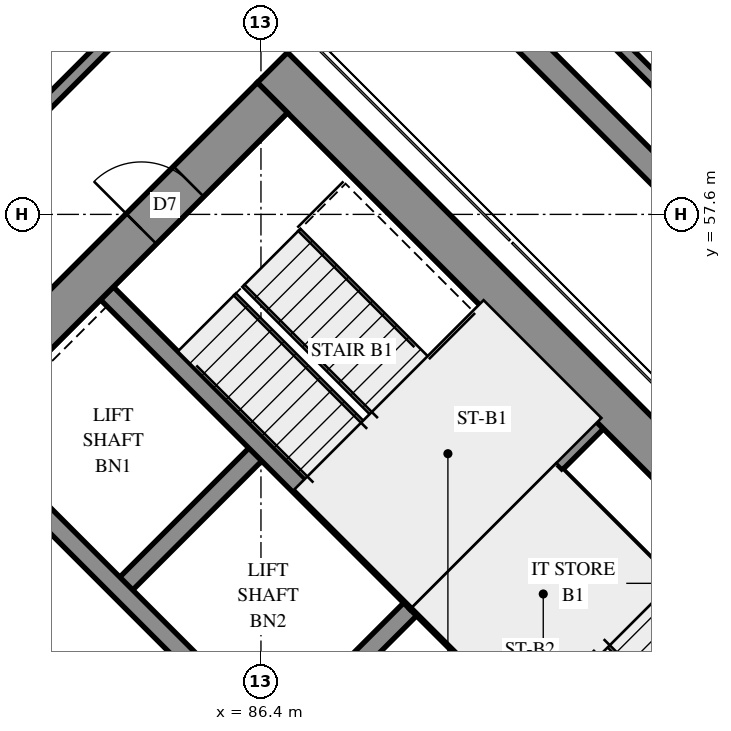
"""IFC4 building model, lengths in metres.
Left out: names, types, materials, properties, quantities, classifications, styles, units other than length and angle.
Written with IfcOpenShell. Run it as: python <this file> out.ifc"""

import sys

from ifc_helpers import new_model, si_unit, direction, frame, frame_2d, origin, place, context, subcontext, project, spatial, polyline, rectangle, outline, extrude, element, fill, save


model = new_model("IFC4")
c1 = context("Model", 3, precision=1e-05, world=origin(), true_north=direction((0.0, 1.0)))
c2 = subcontext(c1, "Body", "Model", "MODEL_VIEW")
j1 = project(units=[si_unit("LENGTHUNIT", "METRE"), si_unit("PLANEANGLEUNIT", "RADIAN")], contexts=[c1])
p1 = place(None, origin())
s1 = spatial("IfcSite", under=j1, at=p1, CompositionType="ELEMENT")
p2 = place(p1, origin())
s2 = spatial("IfcBuilding", under=s1, at=p2, CompositionType="ELEMENT")
p3 = place(p2, frame((0.0, 0.0, 122.0)))
s3 = spatial("IfcBuildingStorey", under=s2, at=p3, CompositionType="ELEMENT", Elevation=122.0)
p4 = place(p3, frame((86.589, 60.014, -0.3), z_axis=(0.0, 0.0, 1.0), x_axis=(0.7071099457, -0.7071036166, 0.0)))
e1 = element("IfcWall", 1, at=p4, inside=s3, PredefinedType="SHEAR", context=c2, shape_type="SweptSolid", body=[
    extrude(rectangle(XDim=15.8, YDim=0.7, at=frame_2d((7.9, 0.0))), origin(), (0.0, 0.0, 1.0), 3.5),
])
p5 = place(p4, frame((10.7, 0.0, 0.3)))
e2 = element("IfcOpeningElement", 2, at=p5, cuts=e1, PredefinedType="OPENING", context=c2, shape_type="SweptSolid", body=[
    extrude(rectangle(XDim=0.8, YDim=2.1, at=frame_2d((0.4, 1.05))), frame((0.0, 0.36, 0.0), z_axis=(0.0, -1.0, 0.0), x_axis=(1.0, 0.0, 0.0)), (0.0, 0.0, 1.0), 0.72),
])
p6 = place(p3, frame((76.407, 49.337, -0.3), z_axis=(0.0, 0.0, 1.0), x_axis=(0.7071067812, 0.7071067812, 0.0)))
e3 = element("IfcWall", 3, at=p6, inside=s3, PredefinedType="SHEAR", context=c2, shape_type="SweptSolid", body=[
    extrude(rectangle(XDim=14.4, YDim=0.7, at=frame_2d((7.2, 0.0))), origin(), (0.0, 0.0, 1.0), 3.5),
])
p7 = place(p6, frame((4.55, 0.0, 0.3)))
e4 = element("IfcOpeningElement", 4, at=p7, cuts=e3, PredefinedType="OPENING", context=c2, shape_type="SweptSolid", body=[
    extrude(rectangle(XDim=1.1, YDim=2.1, at=frame_2d((0.55, 1.05))), frame((0.0, 0.36, 0.0), z_axis=(0.0, -1.0, 0.0), x_axis=(1.0, 0.0, 0.0)), (0.0, 0.0, 1.0), 0.72),
])
p8 = place(p6, frame((11.35, 0.0, 0.3)))
e5 = element("IfcOpeningElement", 5, at=p8, cuts=e3, PredefinedType="OPENING", context=c2, shape_type="SweptSolid", body=[
    extrude(rectangle(XDim=1.1, YDim=2.1, at=frame_2d((0.55, 1.05))), frame((0.0, 0.36, 0.0), z_axis=(0.0, -1.0, 0.0), x_axis=(1.0, 0.0, 0.0)), (0.0, 0.0, 1.0), 0.72),
])
p9 = place(p3, frame((84.079, 51.423, 0.0), z_axis=(0.0, 0.0, 1.0), x_axis=(0.7071219326, 0.7070916295, 0.0)))
e6 = element("IfcWall", 6, at=p9, inside=s3, PredefinedType="SOLIDWALL", context=c2, shape_type="SweptSolid", body=[
    extrude(rectangle(XDim=3.3, YDim=0.3, at=frame_2d((1.65, 0.0))), origin(), (0.0, 0.0, 1.0), 3.9),
])
p10 = place(p3, frame((86.625, 48.878, 0.0), z_axis=(0.0, 0.0, 1.0), x_axis=(0.7071067812, 0.7071067812, 0.0)))
e7 = element("IfcWall", 7, at=p10, inside=s3, PredefinedType="SOLIDWALL", context=c2, shape_type="SweptSolid", body=[
    extrude(rectangle(XDim=3.3, YDim=0.3, at=frame_2d((1.65, 0.0))), origin(), (0.0, 0.0, 1.0), 3.9),
])
p11 = place(p3, frame((78.988, 51.423, 0.0), z_axis=(0.0, 0.0, 1.0), x_axis=(0.7071067812, -0.7071067812, 0.0)))
e8 = element("IfcWall", 8, at=p11, inside=s3, PredefinedType="SOLIDWALL", context=c2, shape_type="SweptSolid", body=[
    extrude(rectangle(XDim=14.4, YDim=0.3, at=frame_2d((7.2, 0.0))), origin(), (0.0, 0.0, 1.0), 3.9),
])
p12 = place(p11, frame((1.25, 0.0, 0.0)))
e9 = element("IfcOpeningElement", 9, at=p12, cuts=e8, PredefinedType="OPENING", context=c2, shape_type="SweptSolid", body=[
    extrude(rectangle(XDim=1.1, YDim=2.1, at=frame_2d((0.55, 1.05))), frame((0.0, 0.16, 0.0), z_axis=(0.0, -1.0, 0.0), x_axis=(1.0, 0.0, 0.0)), (0.0, 0.0, 1.0), 0.32),
])
p13 = place(p11, frame((4.85, 0.0, 0.0)))
e10 = element("IfcOpeningElement", 10, at=p13, cuts=e8, PredefinedType="OPENING", context=c2, shape_type="SweptSolid", body=[
    extrude(rectangle(XDim=1.1, YDim=2.1, at=frame_2d((0.55, 1.05))), frame((0.0, 0.16, 0.0), z_axis=(0.0, -1.0, 0.0), x_axis=(1.0, 0.0, 0.0)), (0.0, 0.0, 1.0), 0.32),
])
p14 = place(p11, frame((8.45, 0.0, 0.0)))
e11 = element("IfcOpeningElement", 11, at=p14, cuts=e8, PredefinedType="OPENING", context=c2, shape_type="SweptSolid", body=[
    extrude(rectangle(XDim=1.1, YDim=2.1, at=frame_2d((0.55, 1.05))), frame((0.0, 0.16, 0.0), z_axis=(0.0, -1.0, 0.0), x_axis=(1.0, 0.0, 0.0)), (0.0, 0.0, 1.0), 0.32),
])
p15 = place(p11, frame((12.05, 0.0, 0.0)))
e12 = element("IfcOpeningElement", 12, at=p15, cuts=e8, PredefinedType="OPENING", context=c2, shape_type="SweptSolid", body=[
    extrude(rectangle(XDim=1.1, YDim=2.1, at=frame_2d((0.55, 1.05))), frame((0.0, 0.16, 0.0), z_axis=(0.0, -1.0, 0.0), x_axis=(1.0, 0.0, 0.0)), (0.0, 0.0, 1.0), 0.32),
])
p16 = place(p3, frame((81.534, 53.969, 0.0), z_axis=(0.0, 0.0, 1.0), x_axis=(0.707103309, -0.7071102534, 0.0)))
e13 = element("IfcWall", 13, at=p16, inside=s3, PredefinedType="SOLIDWALL", context=c2, shape_type="SweptSolid", body=[
    extrude(rectangle(XDim=14.4, YDim=0.3, at=frame_2d((7.2, 0.0))), origin(), (0.0, 0.0, 1.0), 3.9),
])
p17 = place(p16, frame((12.05, 0.0, 0.0)))
e14 = element("IfcOpeningElement", 14, at=p17, cuts=e13, PredefinedType="OPENING", context=c2, shape_type="SweptSolid", body=[
    extrude(rectangle(XDim=1.1, YDim=2.1, at=frame_2d((0.55, 1.05))), frame((0.0, 0.16, 0.0), z_axis=(0.0, -1.0, 0.0), x_axis=(1.0, 0.0, 0.0)), (0.0, 0.0, 1.0), 0.32),
])
for number, where, z_axis, x_axis in (
    (15, (83.867, 56.302, 0.0), (0.0, 0.0, 1.0), (0.707, -0.707, 0.0)),
    (16, (88.958, 51.211, 0.0), (0.0, 0.0, 1.0), (0.707, -0.707, 0.0)),
):
    element("IfcWall", number, at=place(p3, frame(where, z_axis=z_axis, x_axis=x_axis)), inside=s3, PredefinedType="SOLIDWALL", context=c2, shape_type="SweptSolid", body=[
        extrude(rectangle(XDim=7.2, YDim=0.3, at=frame_2d((3.6, 0.0))), origin(), (0.0, 0.0, 1.0), 3.9),
    ])
p18 = place(p3, frame((88.958, 51.211, 0.0), z_axis=(0.0, 0.0, 1.0), x_axis=(0.7071067812, 0.7071067812, 0.0)))
e17 = element("IfcWall", 17, at=p18, inside=s3, PredefinedType="SOLIDWALL", context=c2, shape_type="SweptSolid", body=[
    extrude(rectangle(XDim=4.2, YDim=0.3, at=frame_2d((2.1, 0.0))), origin(), (0.0, 0.0, 1.0), 3.9),
])
p19 = place(p3, frame((107.838, 44.847, 0.0), z_axis=(0.0, 0.0, 1.0), x_axis=(-0.7071067812, 0.7071067812, 0.0)))
e18 = element("IfcWall", 18, at=p19, inside=s3, PredefinedType="SOLIDWALL", context=c2, shape_type="SweptSolid", body=[
    extrude(outline(polyline([(-0.1, -0.1), (39.926, -0.1), (39.843, 0.1), (0.1, 0.1), (-0.1, -0.1)])), origin(), (0.0, 0.0, 1.0), 4.2),
])
p20 = place(p3, frame((91.313, 53.354, 0.0), z_axis=(0.0, 0.0, 1.0), x_axis=(0.7071147811, -0.7070987812, 0.0)))
e19 = element("IfcWall", 19, at=p20, inside=s3, PredefinedType="PARTITIONING", context=c2, shape_type="SweptSolid", body=[
    extrude(rectangle(XDim=6.25, YDim=0.15, at=frame_2d((3.125, 0.0))), origin(), (0.0, 0.0, 1.0), 3.9),
])
p21 = place(p3, frame((80.95, 57.49, 0.0), z_axis=(0.0, 0.0, 1.0), x_axis=(0.7069527442, 0.7072607846, 0.0)))
e20 = element("IfcWall", 20, at=p21, inside=s3, PredefinedType="PARTITIONING", context=c2, shape_type="SweptSolid", body=[
    extrude(rectangle(XDim=6.493, YDim=0.2, at=frame_2d((3.246, 0.0))), origin(), (0.0, 0.0, 1.0), 3.9),
])
p22 = place(p21, frame((0.824, 0.0, 0.0)))
e21 = element("IfcOpeningElement", 21, at=p22, cuts=e20, PredefinedType="OPENING", context=c2, shape_type="SweptSolid", body=[
    extrude(rectangle(XDim=1.0, YDim=2.1, at=frame_2d((0.5, 1.05))), frame((0.0, 0.11, 0.0), z_axis=(0.0, -1.0, 0.0), x_axis=(1.0, 0.0, 0.0)), (0.0, 0.0, 1.0), 0.22),
])
p23 = place(p8, origin())
e22 = element("IfcDoor", 22, at=p23, inside=s3, OperationType="SINGLE_SWING_LEFT", PredefinedType="DOOR", context=c2, shape_type="SweptSolid", body=[
    extrude(rectangle(XDim=1.1, YDim=2.1, at=frame_2d((0.55, 1.05))), frame((0.0, 0.025, 0.0), z_axis=(0.0, -1.0, 0.0), x_axis=(1.0, 0.0, 0.0)), (0.0, 0.0, 1.0), 0.05),
])
fill(e5, e22)
save(model, sys.argv[1])
